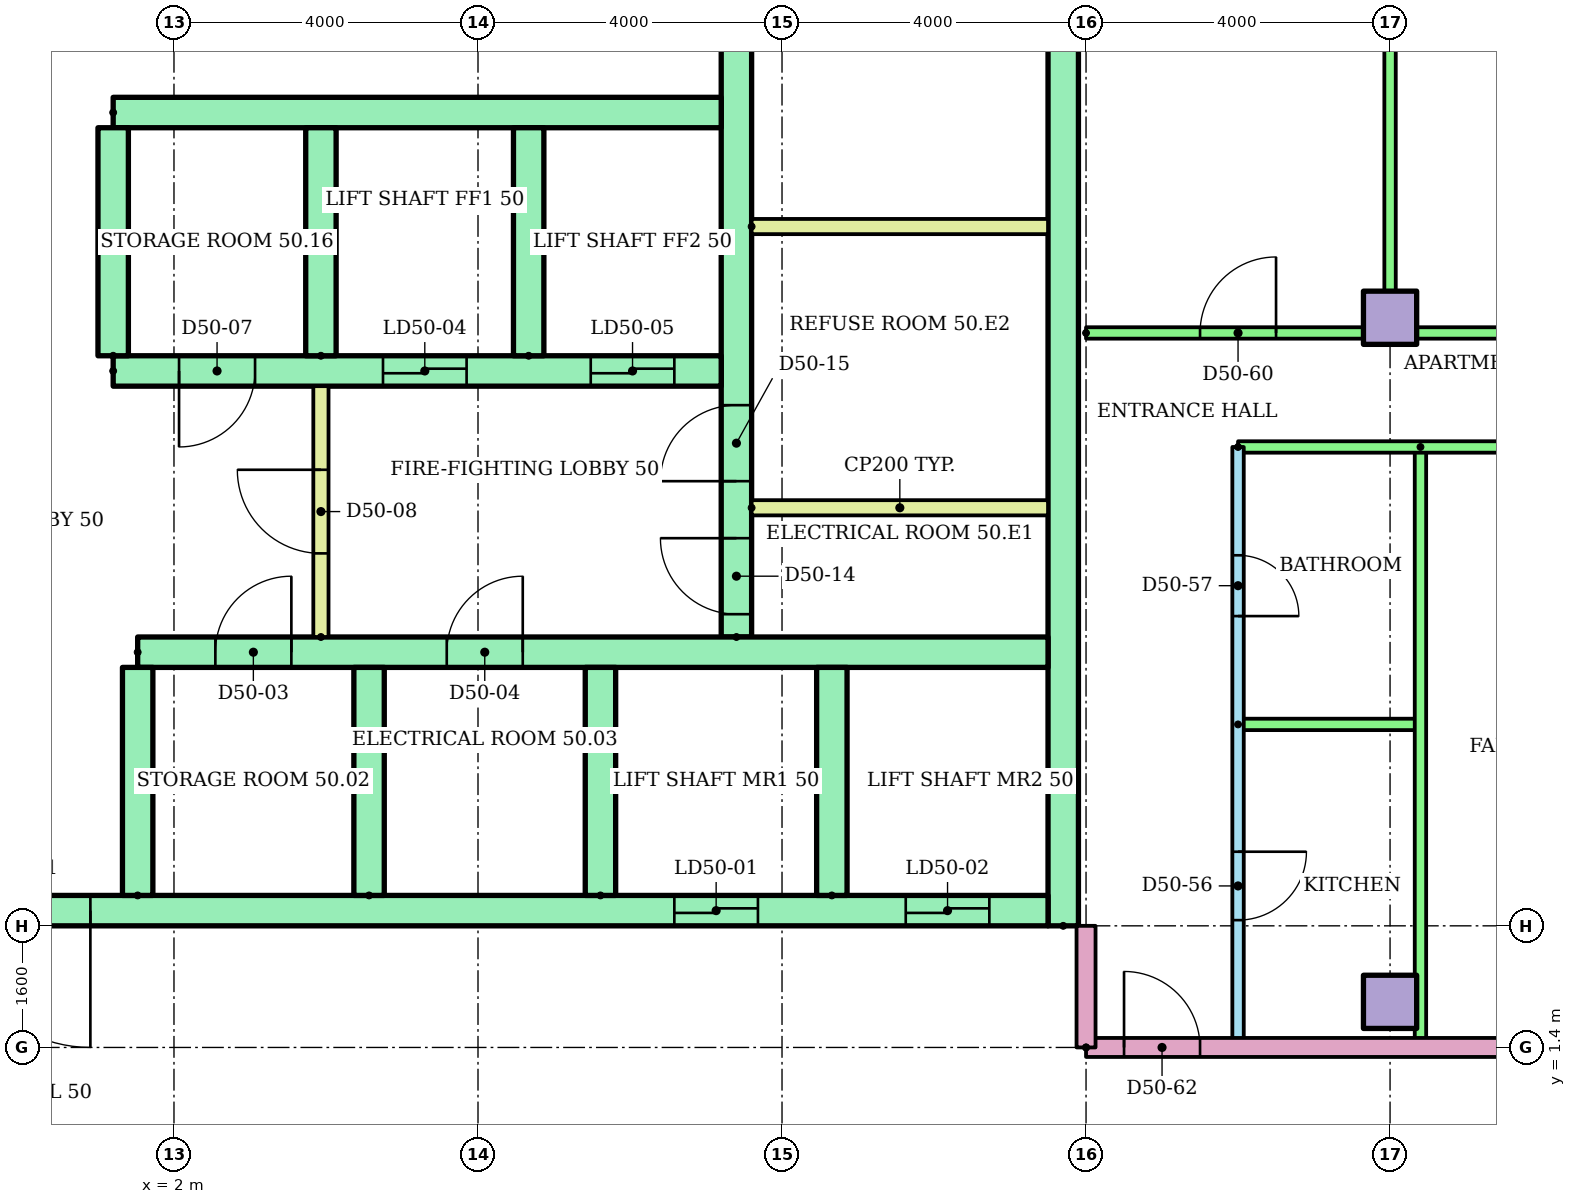
"""IFC4 building model, lengths in metres.
Left out: names, types, materials, properties, quantities, classifications, styles, units other than length and angle.
Written with IfcOpenShell. Run it as: python <this file> out.ifc"""

import sys

from ifc_helpers import new_model, si_unit, direction, frame, frame_2d, origin, origin_2d, place, context, subcontext, project, spatial, rectangle, extrude, element, fill, save


model = new_model("IFC4")
c1 = context("Model", 3, precision=1e-05, world=origin(), true_north=direction((0.0, 1.0)))
c2 = subcontext(c1, "Body", "Model", "MODEL_VIEW")
j1 = project(units=[si_unit("LENGTHUNIT", "METRE"), si_unit("PLANEANGLEUNIT", "RADIAN")], contexts=[c1])
p1 = place(None, origin())
s1 = spatial("IfcSite", under=j1, at=p1, CompositionType="ELEMENT")
p2 = place(p1, origin())
s2 = spatial("IfcBuilding", under=s1, at=p2, CompositionType="ELEMENT")
p3 = place(p2, frame((0.0, 0.0, 190.9)))
s3 = spatial("IfcBuildingStorey", under=s2, at=p3, CompositionType="ELEMENT", Elevation=190.9)
for number, where in (
    (1, (18.0, 2.0, 0.0)),
    (2, (18.0, 11.0, 0.0)),
):
    element("IfcColumn", number, at=place(p3, frame(where)), inside=s3, PredefinedType="COLUMN", context=c2, shape_type="SweptSolid", body=[
        extrude(rectangle(XDim=0.7, YDim=0.7, at=origin_2d()), origin(), (0.0, 0.0, 1.0), 3.2),
    ])
p4 = place(p3, frame((13.7, 3.0, 0.0), z_axis=(0.0, 0.0, 1.0), x_axis=(0.0, 1.0, 0.0)))
e3 = element("IfcWall", 3, at=p4, inside=s3, PredefinedType="SHEAR", context=c2, shape_type="SweptSolid", body=[
    extrude(rectangle(XDim=17.0, YDim=0.4, at=frame_2d((8.5, 0.0))), origin(), (0.0, 0.0, 1.0), 2.8),
])
p5 = place(p3, frame((9.4, 6.8, 0.0), z_axis=(0.0, 0.0, 1.0), x_axis=(0.0, 1.0, 0.0)))
e4 = element("IfcWall", 4, at=p5, inside=s3, PredefinedType="SHEAR", context=c2, shape_type="SweptSolid", body=[
    extrude(rectangle(XDim=12.7, YDim=0.4, at=frame_2d((6.35, 0.0))), origin(), (0.0, 0.0, 1.0), 2.8),
])
p6 = place(p5, frame((0.3, 0.0, 0.0)))
e5 = element("IfcOpeningElement", 5, at=p6, cuts=e4, PredefinedType="OPENING", context=c2, shape_type="SweptSolid", body=[
    extrude(rectangle(XDim=1.0, YDim=2.1, at=frame_2d((0.5, 1.05))), frame((0.0, 0.21, 0.0), z_axis=(0.0, -1.0, 0.0), x_axis=(1.0, 0.0, 0.0)), (0.0, 0.0, 1.0), 0.42),
])
p7 = place(p5, frame((2.05, 0.0, 0.0)))
e6 = element("IfcOpeningElement", 6, at=p7, cuts=e4, PredefinedType="OPENING", context=c2, shape_type="SweptSolid", body=[
    extrude(rectangle(XDim=1.0, YDim=2.1, at=frame_2d((0.5, 1.05))), frame((0.0, 0.21, 0.0), z_axis=(0.0, -1.0, 0.0), x_axis=(1.0, 0.0, 0.0)), (0.0, 0.0, 1.0), 0.42),
])
p8 = place(p5, frame((7.925, 0.0, 0.0)))
e7 = element("IfcOpeningElement", 7, at=p8, cuts=e4, PredefinedType="OPENING", context=c2, shape_type="SweptSolid", body=[
    extrude(rectangle(XDim=1.0, YDim=2.1, at=frame_2d((0.5, 1.05))), frame((0.0, 0.21, 0.0), z_axis=(0.0, -1.0, 0.0), x_axis=(1.0, 0.0, 0.0)), (0.0, 0.0, 1.0), 0.42),
])
p9 = place(p3, frame((-13.5, 3.2, 0.0)))
e8 = element("IfcWall", 8, at=p9, inside=s3, PredefinedType="SHEAR", context=c2, shape_type="SweptSolid", body=[
    extrude(rectangle(XDim=27.0, YDim=0.4, at=frame_2d((13.5, 0.0))), origin(), (0.0, 0.0, 1.0), 2.8),
])
p10 = place(p9, frame((22.083, 0.0, 0.0)))
e9 = element("IfcOpeningElement", 9, at=p10, cuts=e8, PredefinedType="OPENING", context=c2, shape_type="SweptSolid", body=[
    extrude(rectangle(XDim=1.1, YDim=2.1, at=frame_2d((0.55, 1.05))), frame((0.0, 0.21, 0.0), z_axis=(0.0, -1.0, 0.0), x_axis=(1.0, 0.0, 0.0)), (0.0, 0.0, 1.0), 0.42),
])
p11 = place(p9, frame((25.128, 0.0, 0.0)))
e10 = element("IfcOpeningElement", 10, at=p11, cuts=e8, PredefinedType="OPENING", context=c2, shape_type="SweptSolid", body=[
    extrude(rectangle(XDim=1.1, YDim=2.1, at=frame_2d((0.55, 1.05))), frame((0.0, 0.21, 0.0), z_axis=(0.0, -1.0, 0.0), x_axis=(1.0, 0.0, 0.0)), (0.0, 0.0, 1.0), 0.42),
])
p12 = place(p9, frame((12.6, 0.0, 0.0)))
e11 = element("IfcOpeningElement", 11, at=p12, cuts=e8, PredefinedType="OPENING", context=c2, shape_type="SweptSolid", body=[
    extrude(rectangle(XDim=1.8, YDim=2.1, at=frame_2d((0.9, 1.05))), frame((0.0, 0.21, 0.0), z_axis=(0.0, -1.0, 0.0), x_axis=(1.0, 0.0, 0.0)), (0.0, 0.0, 1.0), 0.42),
])
p13 = place(p3, frame((1.522, 6.6, 0.0)))
e12 = element("IfcWall", 12, at=p13, inside=s3, PredefinedType="SHEAR", context=c2, shape_type="SweptSolid", body=[
    extrude(rectangle(XDim=11.978, YDim=0.4, at=frame_2d((5.989, 0.0))), origin(), (0.0, 0.0, 1.0), 2.8),
])
p14 = place(p13, frame((1.022, 0.0, 0.0)))
e13 = element("IfcOpeningElement", 13, at=p14, cuts=e12, PredefinedType="OPENING", context=c2, shape_type="SweptSolid", body=[
    extrude(rectangle(XDim=1.0, YDim=2.1, at=frame_2d((0.5, 1.05))), frame((0.0, 0.21, 0.0), z_axis=(0.0, -1.0, 0.0), x_axis=(1.0, 0.0, 0.0)), (0.0, 0.0, 1.0), 0.42),
])
p15 = place(p13, frame((4.067, 0.0, 0.0)))
e14 = element("IfcOpeningElement", 14, at=p15, cuts=e12, PredefinedType="OPENING", context=c2, shape_type="SweptSolid", body=[
    extrude(rectangle(XDim=1.0, YDim=2.1, at=frame_2d((0.5, 1.05))), frame((0.0, 0.21, 0.0), z_axis=(0.0, -1.0, 0.0), x_axis=(1.0, 0.0, 0.0)), (0.0, 0.0, 1.0), 0.42),
])
for number, where, z_axis, x_axis in (
    (15, (1.522, 3.4, 0.0), (0.0, 0.0, 1.0), (0.0, 1.0, 0.0)),
    (16, (4.567, 3.4, 0.0), (0.0, 0.0, 1.0), (0.0, 1.0, 0.0)),
    (17, (7.611, 3.4, 0.0), (0.0, 0.0, 1.0), (0.0, 1.0, 0.0)),
    (18, (10.656, 3.4, 0.0), (0.0, 0.0, 1.0), (0.0, 1.0, 0.0)),
):
    element("IfcWall", number, at=place(p3, frame(where, z_axis=z_axis, x_axis=x_axis)), inside=s3, PredefinedType="SHEAR", context=c2, shape_type="SweptSolid", body=[
        extrude(rectangle(XDim=3.0, YDim=0.4, at=frame_2d((1.5, 0.0))), origin(), (0.0, 0.0, 1.0), 2.8),
    ])
p16 = place(p3, frame((1.2, 10.3, 0.0)))
e19 = element("IfcWall", 19, at=p16, inside=s3, PredefinedType="SHEAR", context=c2, shape_type="SweptSolid", body=[
    extrude(rectangle(XDim=8.0, YDim=0.4, at=frame_2d((4.0, 0.0))), origin(), (0.0, 0.0, 1.0), 2.8),
])
p17 = place(p16, frame((3.55, 0.0, 0.0)))
e20 = element("IfcOpeningElement", 20, at=p17, cuts=e19, PredefinedType="OPENING", context=c2, shape_type="SweptSolid", body=[
    extrude(rectangle(XDim=1.1, YDim=2.1, at=frame_2d((0.55, 1.05))), frame((0.0, 0.21, 0.0), z_axis=(0.0, -1.0, 0.0), x_axis=(1.0, 0.0, 0.0)), (0.0, 0.0, 1.0), 0.42),
])
p18 = place(p16, frame((6.283, 0.0, 0.0)))
e21 = element("IfcOpeningElement", 21, at=p18, cuts=e19, PredefinedType="OPENING", context=c2, shape_type="SweptSolid", body=[
    extrude(rectangle(XDim=1.1, YDim=2.1, at=frame_2d((0.55, 1.05))), frame((0.0, 0.21, 0.0), z_axis=(0.0, -1.0, 0.0), x_axis=(1.0, 0.0, 0.0)), (0.0, 0.0, 1.0), 0.42),
])
p19 = place(p16, frame((0.867, 0.0, 0.0)))
e22 = element("IfcOpeningElement", 22, at=p19, cuts=e19, PredefinedType="OPENING", context=c2, shape_type="SweptSolid", body=[
    extrude(rectangle(XDim=1.0, YDim=2.1, at=frame_2d((0.5, 1.05))), frame((0.0, 0.21, 0.0), z_axis=(0.0, -1.0, 0.0), x_axis=(1.0, 0.0, 0.0)), (0.0, 0.0, 1.0), 0.42),
])
p20 = place(p3, frame((1.2, 13.7, 0.0)))
e23 = element("IfcWall", 23, at=p20, inside=s3, PredefinedType="SHEAR", context=c2, shape_type="SweptSolid", body=[
    extrude(rectangle(XDim=8.0, YDim=0.4, at=frame_2d((4.0, 0.0))), origin(), (0.0, 0.0, 1.0), 2.8),
])
for number, where, z_axis, x_axis in (
    (24, (1.2, 10.5, 0.0), (0.0, 0.0, 1.0), (0.0, 1.0, 0.0)),
    (25, (3.933, 10.5, 0.0), (0.0, 0.0, 1.0), (0.0, 1.0, 0.0)),
    (26, (6.667, 10.5, 0.0), (0.0, 0.0, 1.0), (0.0, 1.0, 0.0)),
):
    element("IfcWall", number, at=place(p3, frame(where, z_axis=z_axis, x_axis=x_axis)), inside=s3, PredefinedType="SHEAR", context=c2, shape_type="SweptSolid", body=[
        extrude(rectangle(XDim=3.0, YDim=0.4, at=frame_2d((1.5, 0.0))), origin(), (0.0, 0.0, 1.0), 2.8),
    ])
p21 = place(p3, frame((3.933, 6.8, 0.0), z_axis=(0.0, 0.0, 1.0), x_axis=(0.0, 1.0, 0.0)))
e27 = element("IfcWall", 27, at=p21, inside=s3, PredefinedType="PARTITIONING", context=c2, shape_type="SweptSolid", body=[
    extrude(rectangle(XDim=3.3, YDim=0.2, at=frame_2d((1.65, 0.0))), origin(), (0.0, 0.0, 1.0), 2.8),
])
p22 = place(p21, frame((1.1, 0.0, 0.0)))
e28 = element("IfcOpeningElement", 28, at=p22, cuts=e27, PredefinedType="OPENING", context=c2, shape_type="SweptSolid", body=[
    extrude(rectangle(XDim=1.1, YDim=2.1, at=frame_2d((0.55, 1.05))), frame((0.0, 0.11, 0.0), z_axis=(0.0, -1.0, 0.0), x_axis=(1.0, 0.0, 0.0)), (0.0, 0.0, 1.0), 0.22),
])
for number, where in (
    (29, (9.6, 8.5, 0.0)),
    (30, (9.6, 12.2, 0.0)),
):
    element("IfcWall", number, at=place(p3, frame(where)), inside=s3, PredefinedType="PARTITIONING", context=c2, shape_type="SweptSolid", body=[
        extrude(rectangle(XDim=3.9, YDim=0.2, at=frame_2d((1.95, 0.0))), origin(), (0.0, 0.0, 1.0), 2.8),
    ])
p23 = place(p3, frame((16.0, 9.3, 0.0), z_axis=(0.0, 0.0, 1.0), x_axis=(0.0, -1.0, 0.0)))
e31 = element("IfcWall", 31, at=p23, inside=s3, PredefinedType="PARTITIONING", context=c2, shape_type="SweptSolid", body=[
    extrude(rectangle(XDim=7.9, YDim=0.15, at=frame_2d((3.95, 0.0))), origin(), (0.0, 0.0, 1.0), 2.4),
])
p24 = place(p23, frame((5.325, 0.0, 0.0)))
e32 = element("IfcOpeningElement", 32, at=p24, cuts=e31, PredefinedType="OPENING", context=c2, shape_type="SweptSolid", body=[
    extrude(rectangle(XDim=0.9, YDim=2.1, at=frame_2d((0.45, 1.05))), frame((0.0, 0.085, 0.0), z_axis=(0.0, -1.0, 0.0), x_axis=(1.0, 0.0, 0.0)), (0.0, 0.0, 1.0), 0.17),
])
p25 = place(p23, frame((1.425, 0.0, 0.0)))
e33 = element("IfcOpeningElement", 33, at=p25, cuts=e31, PredefinedType="OPENING", context=c2, shape_type="SweptSolid", body=[
    extrude(rectangle(XDim=0.8, YDim=2.1, at=frame_2d((0.4, 1.05))), frame((0.0, 0.085, 0.0), z_axis=(0.0, -1.0, 0.0), x_axis=(1.0, 0.0, 0.0)), (0.0, 0.0, 1.0), 0.17),
])
p26 = place(p3, frame((16.0, 5.65, 0.0)))
e34 = element("IfcWall", 34, at=p26, inside=s3, PredefinedType="PARTITIONING", context=c2, shape_type="SweptSolid", body=[
    extrude(rectangle(XDim=2.4, YDim=0.15, at=frame_2d((1.2, 0.0))), origin(), (0.0, 0.0, 1.0), 2.4),
])
p27 = place(p3, frame((18.4, 9.3, 0.0), z_axis=(0.0, 0.0, 1.0), x_axis=(0.0, -1.0, 0.0)))
e35 = element("IfcWall", 35, at=p27, inside=s3, PredefinedType="PARTITIONING", context=c2, shape_type="SweptSolid", body=[
    extrude(rectangle(XDim=7.9, YDim=0.15, at=frame_2d((3.95, 0.0))), origin(), (0.0, 0.0, 1.0), 2.4),
])
p28 = place(p3, frame((26.0, 9.3, 0.0), z_axis=(0.0, 0.0, 1.0), x_axis=(-1.0, 0.0, 0.0)))
e36 = element("IfcWall", 36, at=p28, inside=s3, PredefinedType="PARTITIONING", context=c2, shape_type="SweptSolid", body=[
    extrude(rectangle(XDim=10.0, YDim=0.15, at=frame_2d((5.0, 0.0))), origin(), (0.0, 0.0, 1.0), 2.4),
])
p29 = place(p28, frame((5.525, 0.0, 0.0)))
e37 = element("IfcOpeningElement", 37, at=p29, cuts=e36, PredefinedType="OPENING", context=c2, shape_type="SweptSolid", body=[
    extrude(rectangle(XDim=0.9, YDim=2.1, at=frame_2d((0.45, 1.05))), frame((0.0, 0.085, 0.0), z_axis=(0.0, -1.0, 0.0), x_axis=(1.0, 0.0, 0.0)), (0.0, 0.0, 1.0), 0.17),
])
p30 = place(p28, frame((1.725, 0.0, 0.0)))
e38 = element("IfcOpeningElement", 38, at=p30, cuts=e36, PredefinedType="OPENING", context=c2, shape_type="SweptSolid", body=[
    extrude(rectangle(XDim=0.9, YDim=2.1, at=frame_2d((0.45, 1.05))), frame((0.0, 0.085, 0.0), z_axis=(0.0, -1.0, 0.0), x_axis=(1.0, 0.0, 0.0)), (0.0, 0.0, 1.0), 0.17),
])
p31 = place(p3, frame((14.0, 10.8, 0.0)))
e39 = element("IfcWall", 39, at=p31, inside=s3, PredefinedType="PARTITIONING", context=c2, shape_type="SweptSolid", body=[
    extrude(rectangle(XDim=12.0, YDim=0.15, at=frame_2d((6.0, 0.0))), origin(), (0.0, 0.0, 1.0), 2.4),
])
p32 = place(p31, frame((1.5, 0.0, 0.0)))
e40 = element("IfcOpeningElement", 40, at=p32, cuts=e39, PredefinedType="OPENING", context=c2, shape_type="SweptSolid", body=[
    extrude(rectangle(XDim=1.0, YDim=2.1, at=frame_2d((0.5, 1.05))), frame((0.0, 0.085, 0.0), z_axis=(0.0, -1.0, 0.0), x_axis=(1.0, 0.0, 0.0)), (0.0, 0.0, 1.0), 0.17),
])
p33 = place(p31, frame((7.5, 0.0, 0.0)))
e41 = element("IfcOpeningElement", 41, at=p33, cuts=e39, PredefinedType="OPENING", context=c2, shape_type="SweptSolid", body=[
    extrude(rectangle(XDim=1.0, YDim=2.1, at=frame_2d((0.5, 1.05))), frame((0.0, 0.085, 0.0), z_axis=(0.0, -1.0, 0.0), x_axis=(1.0, 0.0, 0.0)), (0.0, 0.0, 1.0), 0.17),
])
p34 = place(p3, frame((18.0, 18.821, 0.0), z_axis=(0.0, 0.0, 1.0), x_axis=(0.0, -1.0, 0.0)))
e42 = element("IfcWall", 42, at=p34, inside=s3, PredefinedType="PARTITIONING", context=c2, shape_type="SweptSolid", body=[
    extrude(rectangle(XDim=8.021, YDim=0.15, at=frame_2d((4.01, 0.0))), origin(), (0.0, 0.0, 1.0), 2.4),
])
p35 = place(p3, frame((14.0, 1.4, 0.0)))
e43 = element("IfcWall", 43, at=p35, inside=s3, PredefinedType="PARTITIONING", context=c2, shape_type="SweptSolid", body=[
    extrude(rectangle(XDim=15.0, YDim=0.25, at=frame_2d((7.5, 0.0))), origin(), (0.0, 0.0, 1.0), 2.4),
])
p36 = place(p35, frame((0.5, 0.0, 0.0)))
e44 = element("IfcOpeningElement", 44, at=p36, cuts=e43, PredefinedType="OPENING", context=c2, shape_type="SweptSolid", body=[
    extrude(rectangle(XDim=1.0, YDim=2.1, at=frame_2d((0.5, 1.05))), frame((0.0, 0.135, 0.0), z_axis=(0.0, -1.0, 0.0), x_axis=(1.0, 0.0, 0.0)), (0.0, 0.0, 1.0), 0.27),
])
p37 = place(p35, frame((12.547, 0.0, 0.0)))
e45 = element("IfcOpeningElement", 45, at=p37, cuts=e43, PredefinedType="OPENING", context=c2, shape_type="SweptSolid", body=[
    extrude(rectangle(XDim=1.0, YDim=2.1, at=frame_2d((0.5, 1.05))), frame((0.0, 0.135, 0.0), z_axis=(0.0, -1.0, 0.0), x_axis=(1.0, 0.0, 0.0)), (0.0, 0.0, 1.0), 0.27),
])
p38 = place(p3, frame((14.0, 1.4, 0.0), z_axis=(0.0, 0.0, 1.0), x_axis=(0.0, 1.0, 0.0)))
e46 = element("IfcWall", 46, at=p38, inside=s3, PredefinedType="PARTITIONING", context=c2, shape_type="SweptSolid", body=[
    extrude(rectangle(XDim=1.6, YDim=0.25, at=frame_2d((0.8, 0.0))), origin(), (0.0, 0.0, 1.0), 2.4),
])
p39 = place(p10, origin())
e47 = element("IfcDoor", 47, at=p39, inside=s3, OperationType="SLIDING_TO_LEFT", PredefinedType="DOOR", context=c2, shape_type="SweptSolid", body=[
    extrude(rectangle(XDim=1.1, YDim=2.1, at=frame_2d((0.55, 1.05))), frame((0.0, 0.025, 0.0), z_axis=(0.0, -1.0, 0.0), x_axis=(1.0, 0.0, 0.0)), (0.0, 0.0, 1.0), 0.05),
])
fill(e9, e47)
p40 = place(p11, origin())
e48 = element("IfcDoor", 48, at=p40, inside=s3, OperationType="SLIDING_TO_LEFT", PredefinedType="DOOR", context=c2, shape_type="SweptSolid", body=[
    extrude(rectangle(XDim=1.1, YDim=2.1, at=frame_2d((0.55, 1.05))), frame((0.0, 0.025, 0.0), z_axis=(0.0, -1.0, 0.0), x_axis=(1.0, 0.0, 0.0)), (0.0, 0.0, 1.0), 0.05),
])
fill(e10, e48)
p41 = place(p12, frame((1.8, 0.0, 0.0), z_axis=(0.0, 0.0, 1.0), x_axis=(-1.0, 0.0, 0.0)))
e49 = element("IfcDoor", 49, at=p41, inside=s3, OperationType="DOUBLE_DOOR_SINGLE_SWING", PredefinedType="DOOR", context=c2, shape_type="SweptSolid", body=[
    extrude(rectangle(XDim=1.8, YDim=2.1, at=frame_2d((0.9, 1.05))), frame((0.0, 0.025, 0.0), z_axis=(0.0, -1.0, 0.0), x_axis=(1.0, 0.0, 0.0)), (0.0, 0.0, 1.0), 0.05),
])
fill(e11, e49)
p42 = place(p14, origin())
e50 = element("IfcDoor", 50, at=p42, inside=s3, OperationType="SINGLE_SWING_RIGHT", PredefinedType="DOOR", context=c2, shape_type="SweptSolid", body=[
    extrude(rectangle(XDim=1.0, YDim=2.1, at=frame_2d((0.5, 1.05))), frame((0.0, 0.025, 0.0), z_axis=(0.0, -1.0, 0.0), x_axis=(1.0, 0.0, 0.0)), (0.0, 0.0, 1.0), 0.05),
])
fill(e13, e50)
p43 = place(p15, origin())
e51 = element("IfcDoor", 51, at=p43, inside=s3, OperationType="SINGLE_SWING_RIGHT", PredefinedType="DOOR", context=c2, shape_type="SweptSolid", body=[
    extrude(rectangle(XDim=1.0, YDim=2.1, at=frame_2d((0.5, 1.05))), frame((0.0, 0.025, 0.0), z_axis=(0.0, -1.0, 0.0), x_axis=(1.0, 0.0, 0.0)), (0.0, 0.0, 1.0), 0.05),
])
fill(e14, e51)
p44 = place(p17, origin())
e52 = element("IfcDoor", 52, at=p44, inside=s3, OperationType="SLIDING_TO_LEFT", PredefinedType="DOOR", context=c2, shape_type="SweptSolid", body=[
    extrude(rectangle(XDim=1.1, YDim=2.1, at=frame_2d((0.55, 1.05))), frame((0.0, 0.025, 0.0), z_axis=(0.0, -1.0, 0.0), x_axis=(1.0, 0.0, 0.0)), (0.0, 0.0, 1.0), 0.05),
])
fill(e20, e52)
p45 = place(p18, origin())
e53 = element("IfcDoor", 53, at=p45, inside=s3, OperationType="SLIDING_TO_LEFT", PredefinedType="DOOR", context=c2, shape_type="SweptSolid", body=[
    extrude(rectangle(XDim=1.1, YDim=2.1, at=frame_2d((0.55, 1.05))), frame((0.0, 0.025, 0.0), z_axis=(0.0, -1.0, 0.0), x_axis=(1.0, 0.0, 0.0)), (0.0, 0.0, 1.0), 0.05),
])
fill(e21, e53)
p46 = place(p19, frame((1.0, 0.0, 0.0), z_axis=(0.0, 0.0, 1.0), x_axis=(-1.0, 0.0, 0.0)))
e54 = element("IfcDoor", 54, at=p46, inside=s3, OperationType="SINGLE_SWING_LEFT", PredefinedType="DOOR", context=c2, shape_type="SweptSolid", body=[
    extrude(rectangle(XDim=1.0, YDim=2.1, at=frame_2d((0.5, 1.05))), frame((0.0, 0.025, 0.0), z_axis=(0.0, -1.0, 0.0), x_axis=(1.0, 0.0, 0.0)), (0.0, 0.0, 1.0), 0.05),
])
fill(e22, e54)
p47 = place(p22, origin())
e55 = element("IfcDoor", 55, at=p47, inside=s3, OperationType="SINGLE_SWING_RIGHT", PredefinedType="DOOR", context=c2, shape_type="SweptSolid", body=[
    extrude(rectangle(XDim=1.1, YDim=2.1, at=frame_2d((0.55, 1.05))), frame((0.0, 0.025, 0.0), z_axis=(0.0, -1.0, 0.0), x_axis=(1.0, 0.0, 0.0)), (0.0, 0.0, 1.0), 0.05),
])
fill(e28, e55)
p48 = place(p6, origin())
e56 = element("IfcDoor", 56, at=p48, inside=s3, OperationType="SINGLE_SWING_RIGHT", PredefinedType="DOOR", context=c2, shape_type="SweptSolid", body=[
    extrude(rectangle(XDim=1.0, YDim=2.1, at=frame_2d((0.5, 1.05))), frame((0.0, 0.025, 0.0), z_axis=(0.0, -1.0, 0.0), x_axis=(1.0, 0.0, 0.0)), (0.0, 0.0, 1.0), 0.05),
])
fill(e5, e56)
p49 = place(p7, origin())
e57 = element("IfcDoor", 57, at=p49, inside=s3, OperationType="SINGLE_SWING_LEFT", PredefinedType="DOOR", context=c2, shape_type="SweptSolid", body=[
    extrude(rectangle(XDim=1.0, YDim=2.1, at=frame_2d((0.5, 1.05))), frame((0.0, 0.025, 0.0), z_axis=(0.0, -1.0, 0.0), x_axis=(1.0, 0.0, 0.0)), (0.0, 0.0, 1.0), 0.05),
])
fill(e6, e57)
p50 = place(p24, origin())
e58 = element("IfcDoor", 58, at=p50, inside=s3, OperationType="SINGLE_SWING_LEFT", PredefinedType="DOOR", context=c2, shape_type="SweptSolid", body=[
    extrude(rectangle(XDim=0.9, YDim=2.1, at=frame_2d((0.45, 1.05))), frame((0.0, 0.025, 0.0), z_axis=(0.0, -1.0, 0.0), x_axis=(1.0, 0.0, 0.0)), (0.0, 0.0, 1.0), 0.05),
])
fill(e32, e58)
p51 = place(p25, origin())
e59 = element("IfcDoor", 59, at=p51, inside=s3, OperationType="SINGLE_SWING_RIGHT", PredefinedType="DOOR", context=c2, shape_type="SweptSolid", body=[
    extrude(rectangle(XDim=0.8, YDim=2.1, at=frame_2d((0.4, 1.05))), frame((0.0, 0.025, 0.0), z_axis=(0.0, -1.0, 0.0), x_axis=(1.0, 0.0, 0.0)), (0.0, 0.0, 1.0), 0.05),
])
fill(e33, e59)
p52 = place(p32, origin())
e60 = element("IfcDoor", 60, at=p52, inside=s3, OperationType="SINGLE_SWING_RIGHT", PredefinedType="DOOR", context=c2, shape_type="SweptSolid", body=[
    extrude(rectangle(XDim=1.0, YDim=2.1, at=frame_2d((0.5, 1.05))), frame((0.0, 0.025, 0.0), z_axis=(0.0, -1.0, 0.0), x_axis=(1.0, 0.0, 0.0)), (0.0, 0.0, 1.0), 0.05),
])
fill(e40, e60)
p53 = place(p36, origin())
e61 = element("IfcDoor", 61, at=p53, inside=s3, OperationType="SINGLE_SWING_LEFT", PredefinedType="DOOR", context=c2, shape_type="SweptSolid", body=[
    extrude(rectangle(XDim=1.0, YDim=2.1, at=frame_2d((0.5, 1.05))), frame((0.0, 0.025, 0.0), z_axis=(0.0, -1.0, 0.0), x_axis=(1.0, 0.0, 0.0)), (0.0, 0.0, 1.0), 0.05),
])
fill(e44, e61)
save(model, sys.argv[1])
